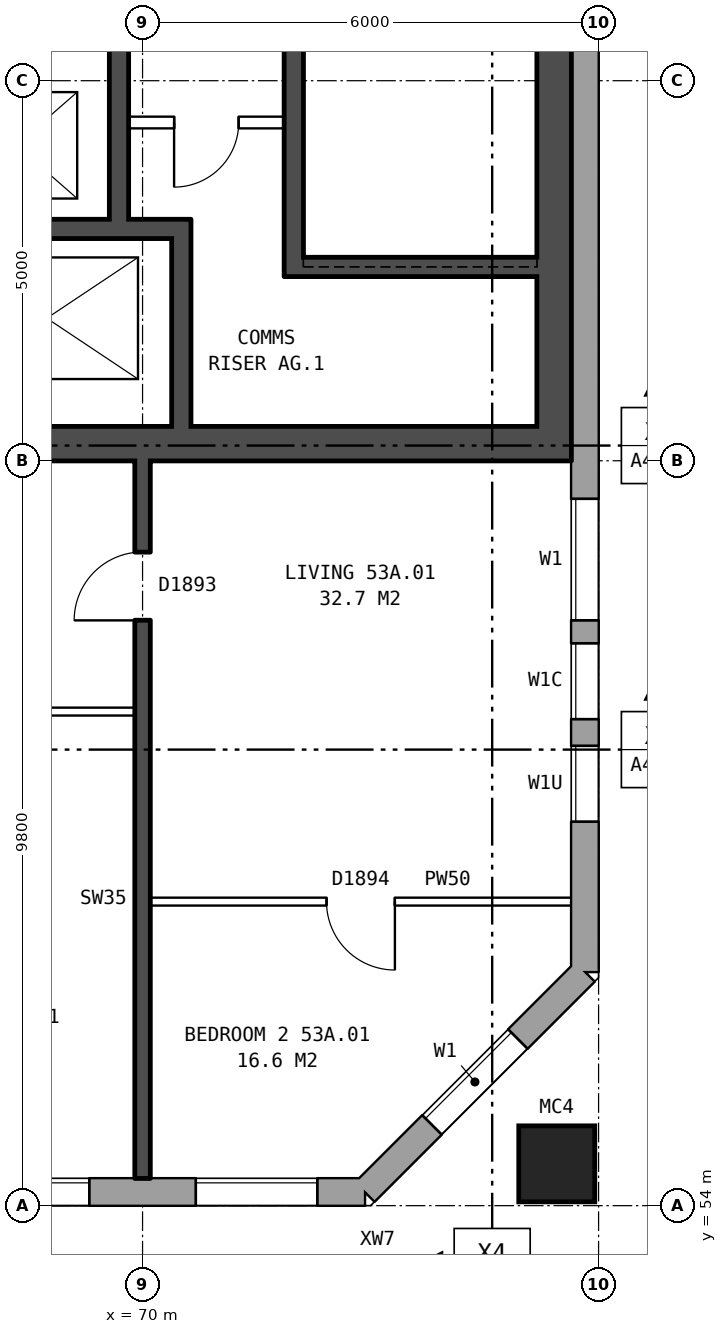
"""IFC4 building model, lengths in metres.
Left out: names, types, materials, properties, quantities, classifications, styles, units other than length and angle.
Written with IfcOpenShell. Run it as: python <this file> out.ifc"""

import sys

from ifc_helpers import new_model, si_unit, direction, frame, frame_2d, origin, origin_2d, place, context, subcontext, project, spatial, rectangle, hollow_rectangle, extrude, element, fill, save


model = new_model("IFC4")
c1 = context("Model", 3, precision=1e-05, world=origin(), true_north=direction((0.0, 1.0)))
c2 = subcontext(c1, "Body", "Model", "MODEL_VIEW")
j1 = project(units=[si_unit("LENGTHUNIT", "METRE"), si_unit("PLANEANGLEUNIT", "RADIAN")], contexts=[c1])
p1 = place(None, origin())
s1 = spatial("IfcSite", under=j1, at=p1, CompositionType="ELEMENT")
p2 = place(p1, origin())
s2 = spatial("IfcBuilding", under=s1, at=p2, CompositionType="ELEMENT")
p3 = place(p2, frame((0.0, 0.0, 188.2)))
s3 = spatial("IfcBuildingStorey", under=s2, at=p3, CompositionType="ELEMENT", Elevation=188.2)
p4 = place(p3, frame((75.45, 54.55, 0.0), z_axis=(0.0, 0.0, 1.0), x_axis=(1.0, 0.0, 0.0)))
e1 = element("IfcColumn", 1, at=p4, inside=s3, PredefinedType="COLUMN", context=c2, shape_type="SweptSolid", body=[
    extrude(hollow_rectangle(XDim=1.0, YDim=1.0, WallThickness=0.055, at=origin_2d()), origin(), (0.0, 0.0, 1.0), 3.1),
])
p5 = place(p3, frame((33.325, 54.18, 0.0), z_axis=(0.0, 0.0, 1.0), x_axis=(1.0, 0.0, 0.0)))
e2 = element("IfcWall", 2, at=p5, inside=s3, PredefinedType="STANDARD", context=c2, shape_type="SweptSolid", body=[
    extrude(rectangle(XDim=39.601, YDim=0.36, at=frame_2d((19.8, 0.0))), origin(), (0.0, 0.0, 1.0), 2.85),
])
p6 = place(p5, frame((1.375, 0.0, 0.8)))
e3 = element("IfcOpeningElement", 3, at=p6, cuts=e2, PredefinedType="OPENING", context=c2, shape_type="SweptSolid", body=[
    extrude(rectangle(XDim=1.6, YDim=1.8, at=frame_2d((0.8, 0.9))), frame((0.0, 0.19, 0.0), z_axis=(0.0, -1.0, 0.0), x_axis=(1.0, 0.0, 0.0)), (0.0, 0.0, 1.0), 0.38),
])
p7 = place(p5, frame((4.375, 0.0, 0.8)))
e4 = element("IfcOpeningElement", 4, at=p7, cuts=e2, PredefinedType="OPENING", context=c2, shape_type="SweptSolid", body=[
    extrude(rectangle(XDim=1.6, YDim=1.8, at=frame_2d((0.8, 0.9))), frame((0.0, 0.19, 0.0), z_axis=(0.0, -1.0, 0.0), x_axis=(1.0, 0.0, 0.0)), (0.0, 0.0, 1.0), 0.38),
])
p8 = place(p5, frame((7.375, 0.0, 0.8)))
e5 = element("IfcOpeningElement", 5, at=p8, cuts=e2, PredefinedType="OPENING", context=c2, shape_type="SweptSolid", body=[
    extrude(rectangle(XDim=1.6, YDim=1.8, at=frame_2d((0.8, 0.9))), frame((0.0, 0.19, 0.0), z_axis=(0.0, -1.0, 0.0), x_axis=(1.0, 0.0, 0.0)), (0.0, 0.0, 1.0), 0.38),
])
p9 = place(p5, frame((10.375, 0.0, 0.8)))
e6 = element("IfcOpeningElement", 6, at=p9, cuts=e2, PredefinedType="OPENING", context=c2, shape_type="SweptSolid", body=[
    extrude(rectangle(XDim=1.6, YDim=1.8, at=frame_2d((0.8, 0.9))), frame((0.0, 0.19, 0.0), z_axis=(0.0, -1.0, 0.0), x_axis=(1.0, 0.0, 0.0)), (0.0, 0.0, 1.0), 0.38),
])
p10 = place(p5, frame((12.875, 0.0, 0.8)))
e7 = element("IfcOpeningElement", 7, at=p10, cuts=e2, PredefinedType="OPENING", context=c2, shape_type="SweptSolid", body=[
    extrude(rectangle(XDim=1.2, YDim=1.8, at=frame_2d((0.6, 0.9))), frame((0.0, 0.19, 0.0), z_axis=(0.0, -1.0, 0.0), x_axis=(1.0, 0.0, 0.0)), (0.0, 0.0, 1.0), 0.38),
])
p11 = place(p5, frame((16.225, 0.0, 0.8)))
e8 = element("IfcOpeningElement", 8, at=p11, cuts=e2, PredefinedType="OPENING", context=c2, shape_type="SweptSolid", body=[
    extrude(rectangle(XDim=0.6, YDim=0.9, at=frame_2d((0.3, 0.45))), frame((0.0, 0.19, 0.0), z_axis=(0.0, -1.0, 0.0), x_axis=(1.0, 0.0, 0.0)), (0.0, 0.0, 1.0), 0.38),
])
p12 = place(p5, frame((19.375, 0.0, 0.8)))
e9 = element("IfcOpeningElement", 9, at=p12, cuts=e2, PredefinedType="OPENING", context=c2, shape_type="SweptSolid", body=[
    extrude(rectangle(XDim=1.6, YDim=1.8, at=frame_2d((0.8, 0.9))), frame((0.0, 0.19, 0.0), z_axis=(0.0, -1.0, 0.0), x_axis=(1.0, 0.0, 0.0)), (0.0, 0.0, 1.0), 0.38),
])
p13 = place(p5, frame((21.875, 0.0, 0.15)))
e10 = element("IfcOpeningElement", 10, at=p13, cuts=e2, PredefinedType="OPENING", context=c2, shape_type="SweptSolid", body=[
    extrude(rectangle(XDim=1.2, YDim=1.8, at=frame_2d((0.6, 0.9))), frame((0.0, 0.19, 0.0), z_axis=(0.0, -1.0, 0.0), x_axis=(1.0, 0.0, 0.0)), (0.0, 0.0, 1.0), 0.38),
])
p14 = place(p5, frame((25.375, 0.0, 0.8)))
e11 = element("IfcOpeningElement", 11, at=p14, cuts=e2, PredefinedType="OPENING", context=c2, shape_type="SweptSolid", body=[
    extrude(rectangle(XDim=1.6, YDim=1.8, at=frame_2d((0.8, 0.9))), frame((0.0, 0.19, 0.0), z_axis=(0.0, -1.0, 0.0), x_axis=(1.0, 0.0, 0.0)), (0.0, 0.0, 1.0), 0.38),
])
p15 = place(p5, frame((28.375, 0.0, 0.8)))
e12 = element("IfcOpeningElement", 12, at=p15, cuts=e2, PredefinedType="OPENING", context=c2, shape_type="SweptSolid", body=[
    extrude(rectangle(XDim=1.6, YDim=1.8, at=frame_2d((0.8, 0.9))), frame((0.0, 0.19, 0.0), z_axis=(0.0, -1.0, 0.0), x_axis=(1.0, 0.0, 0.0)), (0.0, 0.0, 1.0), 0.38),
])
p16 = place(p5, frame((31.375, 0.0, 0.8)))
e13 = element("IfcOpeningElement", 13, at=p16, cuts=e2, PredefinedType="OPENING", context=c2, shape_type="SweptSolid", body=[
    extrude(rectangle(XDim=1.6, YDim=1.8, at=frame_2d((0.8, 0.9))), frame((0.0, 0.19, 0.0), z_axis=(0.0, -1.0, 0.0), x_axis=(1.0, 0.0, 0.0)), (0.0, 0.0, 1.0), 0.38),
])
p17 = place(p5, frame((34.375, 0.0, 0.8)))
e14 = element("IfcOpeningElement", 14, at=p17, cuts=e2, PredefinedType="OPENING", context=c2, shape_type="SweptSolid", body=[
    extrude(rectangle(XDim=1.6, YDim=1.8, at=frame_2d((0.8, 0.9))), frame((0.0, 0.19, 0.0), z_axis=(0.0, -1.0, 0.0), x_axis=(1.0, 0.0, 0.0)), (0.0, 0.0, 1.0), 0.38),
])
p18 = place(p5, frame((37.375, 0.0, 0.8)))
e15 = element("IfcOpeningElement", 15, at=p18, cuts=e2, PredefinedType="OPENING", context=c2, shape_type="SweptSolid", body=[
    extrude(rectangle(XDim=1.6, YDim=1.8, at=frame_2d((0.8, 0.9))), frame((0.0, 0.19, 0.0), z_axis=(0.0, -1.0, 0.0), x_axis=(1.0, 0.0, 0.0)), (0.0, 0.0, 1.0), 0.38),
])
p19 = place(p5, frame((14.375, 0.0, 1.6)))
e16 = element("IfcOpeningElement", 16, at=p19, cuts=e2, PredefinedType="OPENING", context=c2, shape_type="SweptSolid", body=[
    extrude(rectangle(XDim=0.6, YDim=0.9, at=frame_2d((0.3, 0.45))), frame((0.0, 0.19, 0.0), z_axis=(0.0, -1.0, 0.0), x_axis=(1.0, 0.0, 0.0)), (0.0, 0.0, 1.0), 0.38),
])
p20 = place(p5, frame((17.125, 0.0, 0.8)))
e17 = element("IfcOpeningElement", 17, at=p20, cuts=e2, PredefinedType="OPENING", context=c2, shape_type="SweptSolid", body=[
    extrude(rectangle(XDim=1.2, YDim=1.8, at=frame_2d((0.6, 0.9))), frame((0.0, 0.19, 0.0), z_axis=(0.0, -1.0, 0.0), x_axis=(1.0, 0.0, 0.0)), (0.0, 0.0, 1.0), 0.38),
])
p21 = place(p5, frame((23.375, 0.0, 0.15)))
e18 = element("IfcOpeningElement", 18, at=p21, cuts=e2, PredefinedType="OPENING", context=c2, shape_type="SweptSolid", body=[
    extrude(rectangle(XDim=0.6, YDim=0.9, at=frame_2d((0.3, 0.45))), frame((0.0, 0.19, 0.0), z_axis=(0.0, -1.0, 0.0), x_axis=(1.0, 0.0, 0.0)), (0.0, 0.0, 1.0), 0.38),
])
p22 = place(p3, frame((72.925, 54.18, 0.0), z_axis=(0.0, 0.0, 1.0), x_axis=(0.707106781187, 0.707106781187, 0.0)))
e19 = element("IfcWall", 19, at=p22, inside=s3, PredefinedType="STANDARD", context=c2, shape_type="SweptSolid", body=[
    extrude(rectangle(XDim=4.094, YDim=0.36, at=frame_2d((2.047, 0.0))), origin(), (0.0, 0.0, 1.0), 2.85),
])
p23 = place(p22, frame((1.247, 0.0, 0.8)))
e20 = element("IfcOpeningElement", 20, at=p23, cuts=e19, PredefinedType="OPENING", context=c2, shape_type="SweptSolid", body=[
    extrude(rectangle(XDim=1.6, YDim=1.8, at=frame_2d((0.8, 0.9))), frame((0.0, 0.19, 0.0), z_axis=(0.0, -1.0, 0.0), x_axis=(1.0, 0.0, 0.0)), (0.0, 0.0, 1.0), 0.38),
])
p24 = place(p3, frame((75.82, 57.075, 0.0), z_axis=(0.0, 0.0, 1.0), x_axis=(0.0, 1.0, 0.0)))
e21 = element("IfcWall", 21, at=p24, inside=s3, PredefinedType="STANDARD", context=c2, shape_type="SweptSolid", body=[
    extrude(rectangle(XDim=25.851, YDim=0.36, at=frame_2d((12.925, 0.0))), origin(), (0.0, 0.0, 1.0), 2.85),
])
p25 = place(p24, frame((1.975, 0.0, 1.7)))
e22 = element("IfcOpeningElement", 22, at=p25, cuts=e21, PredefinedType="OPENING", context=c2, shape_type="SweptSolid", body=[
    extrude(rectangle(XDim=1.0, YDim=0.9, at=frame_2d((0.5, 0.45))), frame((0.0, 0.19, 0.0), z_axis=(0.0, -1.0, 0.0), x_axis=(1.0, 0.0, 0.0)), (0.0, 0.0, 1.0), 0.38),
])
p26 = place(p24, frame((4.625, 0.0, 0.8)))
e23 = element("IfcOpeningElement", 23, at=p26, cuts=e21, PredefinedType="OPENING", context=c2, shape_type="SweptSolid", body=[
    extrude(rectangle(XDim=1.6, YDim=1.8, at=frame_2d((0.8, 0.9))), frame((0.0, 0.19, 0.0), z_axis=(0.0, -1.0, 0.0), x_axis=(1.0, 0.0, 0.0)), (0.0, 0.0, 1.0), 0.38),
])
p27 = place(p24, frame((19.625, 0.0, 0.8)))
e24 = element("IfcOpeningElement", 24, at=p27, cuts=e21, PredefinedType="OPENING", context=c2, shape_type="SweptSolid", body=[
    extrude(rectangle(XDim=1.6, YDim=1.8, at=frame_2d((0.8, 0.9))), frame((0.0, 0.19, 0.0), z_axis=(0.0, -1.0, 0.0), x_axis=(1.0, 0.0, 0.0)), (0.0, 0.0, 1.0), 0.38),
])
p28 = place(p24, frame((21.55, 0.0, 1.1)))
e25 = element("IfcOpeningElement", 25, at=p28, cuts=e21, PredefinedType="OPENING", context=c2, shape_type="SweptSolid", body=[
    extrude(rectangle(XDim=1.4, YDim=1.5, at=frame_2d((0.7, 0.75))), frame((0.0, 0.19, 0.0), z_axis=(0.0, -1.0, 0.0), x_axis=(1.0, 0.0, 0.0)), (0.0, 0.0, 1.0), 0.38),
])
p29 = place(p24, frame((3.325, 0.0, 0.8)))
e26 = element("IfcOpeningElement", 26, at=p29, cuts=e21, PredefinedType="OPENING", context=c2, shape_type="SweptSolid", body=[
    extrude(rectangle(XDim=1.0, YDim=1.8, at=frame_2d((0.5, 0.9))), frame((0.0, 0.19, 0.0), z_axis=(0.0, -1.0, 0.0), x_axis=(1.0, 0.0, 0.0)), (0.0, 0.0, 1.0), 0.38),
])
p30 = place(p24, frame((23.25, 0.0, 1.7)))
e27 = element("IfcOpeningElement", 27, at=p30, cuts=e21, PredefinedType="OPENING", context=c2, shape_type="SweptSolid", body=[
    extrude(rectangle(XDim=0.6, YDim=0.9, at=frame_2d((0.3, 0.45))), frame((0.0, 0.19, 0.0), z_axis=(0.0, -1.0, 0.0), x_axis=(1.0, 0.0, 0.0)), (0.0, 0.0, 1.0), 0.38),
])
p31 = place(p3, frame((75.415, 63.8, 0.0), z_axis=(0.0, 0.0, 1.0), x_axis=(0.0, 1.0, 0.0)))
e28 = element("IfcWall", 28, at=p31, inside=s3, PredefinedType="SHEAR", context=c2, shape_type="SweptSolid", body=[
    extrude(rectangle(XDim=12.4, YDim=0.45, at=frame_2d((6.2, 0.0))), origin(), (0.0, 0.0, 1.0), 2.85),
])
p32 = place(p3, frame((67.09, 64.025, 0.0), z_axis=(0.0, 0.0, 1.0), x_axis=(1.0, 0.0, 0.0)))
e29 = element("IfcWall", 29, at=p32, inside=s3, PredefinedType="SHEAR", context=c2, shape_type="SweptSolid", body=[
    extrude(rectangle(XDim=8.1, YDim=0.45, at=frame_2d((4.05, 0.0))), origin(), (0.0, 0.0, 1.0), 2.85),
])
p33 = place(p3, frame((72.115, 66.35, 0.0), z_axis=(0.0, 0.0, 1.0), x_axis=(1.0, 0.0, 0.0)))
e30 = element("IfcWall", 30, at=p33, inside=s3, PredefinedType="SHEAR", context=c2, shape_type="SweptSolid", body=[
    extrude(rectangle(XDim=3.075, YDim=0.25, at=frame_2d((1.538, 0.0))), origin(), (0.0, 0.0, 1.0), 2.85),
])
p34 = place(p3, frame((67.09, 66.85, 0.0), z_axis=(0.0, 0.0, 1.0), x_axis=(1.0, 0.0, 0.0)))
e31 = element("IfcWall", 31, at=p34, inside=s3, PredefinedType="SHEAR", context=c2, shape_type="SweptSolid", body=[
    extrude(rectangle(XDim=3.545, YDim=0.25, at=frame_2d((1.772, 0.0))), origin(), (0.0, 0.0, 1.0), 2.85),
])
p35 = place(p3, frame((69.815, 68.25, 0.0), z_axis=(0.0, 0.0, 1.0), x_axis=(1.0, 0.0, 0.0)))
e32 = element("IfcWall", 32, at=p35, inside=s3, PredefinedType="PARTITIONING", context=c2, shape_type="SweptSolid", body=[
    extrude(rectangle(XDim=2.05, YDim=0.15, at=frame_2d((1.025, 0.0))), origin(), (0.0, 0.0, 1.0), 2.85),
])
p36 = place(p35, frame((0.6, 0.0, 0.0)))
e33 = element("IfcOpeningElement", 33, at=p36, cuts=e32, PredefinedType="OPENING", context=c2, shape_type="SweptSolid", body=[
    extrude(rectangle(XDim=0.85, YDim=2.1, at=frame_2d((0.425, 1.05))), frame((0.0, 0.085, 0.0), z_axis=(0.0, -1.0, 0.0), x_axis=(1.0, 0.0, 0.0)), (0.0, 0.0, 1.0), 0.17),
])
p37 = place(p3, frame((69.69, 66.975, 0.0), z_axis=(0.0, 0.0, 1.0), x_axis=(0.0, 1.0, 0.0)))
e34 = element("IfcWall", 34, at=p37, inside=s3, PredefinedType="SHEAR", context=c2, shape_type="SweptSolid", body=[
    extrude(rectangle(XDim=6.6, YDim=0.25, at=frame_2d((3.3, 0.0))), origin(), (0.0, 0.0, 1.0), 2.85),
])
p38 = place(p3, frame((70.51, 64.25, 0.0), z_axis=(0.0, 0.0, 1.0), x_axis=(0.0, 1.0, 0.0)))
e35 = element("IfcWall", 35, at=p38, inside=s3, PredefinedType="SHEAR", context=c2, shape_type="SweptSolid", body=[
    extrude(rectangle(XDim=2.475, YDim=0.25, at=frame_2d((1.238, 0.0))), origin(), (0.0, 0.0, 1.0), 2.85),
])
p39 = place(p3, frame((71.99, 66.225, 0.0), z_axis=(0.0, 0.0, 1.0), x_axis=(0.0, 1.0, 0.0)))
e36 = element("IfcWall", 36, at=p39, inside=s3, PredefinedType="SHEAR", context=c2, shape_type="SweptSolid", body=[
    extrude(rectangle(XDim=7.225, YDim=0.25, at=frame_2d((3.612, 0.0))), origin(), (0.0, 0.0, 1.0), 2.85),
])
p40 = place(p39, frame((5.925, 0.0, 0.0)))
e37 = element("IfcOpeningElement", 37, at=p40, cuts=e36, PredefinedType="OPENING", context=c2, shape_type="SweptSolid", body=[
    extrude(rectangle(XDim=1.1, YDim=2.1, at=frame_2d((0.55, 1.05))), frame((0.0, 0.135, 0.0), z_axis=(0.0, -1.0, 0.0), x_axis=(1.0, 0.0, 0.0)), (0.0, 0.0, 1.0), 0.27),
])
p41 = place(p3, frame((70.1, 58.0, 0.0), z_axis=(0.0, 0.0, 1.0), x_axis=(1.0, 0.0, 0.0)))
e38 = element("IfcWall", 38, at=p41, inside=s3, PredefinedType="PARTITIONING", context=c2, shape_type="SweptSolid", body=[
    extrude(rectangle(XDim=5.54, YDim=0.1, at=frame_2d((2.77, 0.0))), origin(), (0.0, 0.0, 1.0), 2.85),
])
p42 = place(p41, frame((2.32, 0.0, 0.0)))
e39 = element("IfcOpeningElement", 39, at=p42, cuts=e38, PredefinedType="OPENING", context=c2, shape_type="SweptSolid", body=[
    extrude(rectangle(XDim=0.9, YDim=2.1, at=frame_2d((0.45, 1.05))), frame((0.0, 0.06, 0.0), z_axis=(0.0, -1.0, 0.0), x_axis=(1.0, 0.0, 0.0)), (0.0, 0.0, 1.0), 0.12),
])
p43 = place(p3, frame((64.1, 60.5, 0.0), z_axis=(0.0, 0.0, 1.0), x_axis=(1.0, 0.0, 0.0)))
e40 = element("IfcWall", 40, at=p43, inside=s3, PredefinedType="PARTITIONING", context=c2, shape_type="SweptSolid", body=[
    extrude(rectangle(XDim=5.8, YDim=0.1, at=frame_2d((2.9, 0.0))), origin(), (0.0, 0.0, 1.0), 2.85),
])
p44 = place(p43, frame((3.6, 0.0, 0.0)))
e41 = element("IfcOpeningElement", 41, at=p44, cuts=e40, PredefinedType="OPENING", context=c2, shape_type="SweptSolid", body=[
    extrude(rectangle(XDim=0.9, YDim=2.1, at=frame_2d((0.45, 1.05))), frame((0.0, 0.06, 0.0), z_axis=(0.0, -1.0, 0.0), x_axis=(1.0, 0.0, 0.0)), (0.0, 0.0, 1.0), 0.12),
])
p45 = place(p43, frame((0.7, 0.0, 0.0)))
e42 = element("IfcOpeningElement", 42, at=p45, cuts=e40, PredefinedType="OPENING", context=c2, shape_type="SweptSolid", body=[
    extrude(rectangle(XDim=0.9, YDim=2.1, at=frame_2d((0.45, 1.05))), frame((0.0, 0.06, 0.0), z_axis=(0.0, -1.0, 0.0), x_axis=(1.0, 0.0, 0.0)), (0.0, 0.0, 1.0), 0.12),
])
p46 = place(p3, frame((70.0, 54.36, 0.0), z_axis=(0.0, 0.0, 1.0), x_axis=(0.0, 1.0, 0.0)))
e43 = element("IfcWall", 43, at=p46, inside=s3, PredefinedType="SOLIDWALL", context=c2, shape_type="SweptSolid", body=[
    extrude(rectangle(XDim=9.44, YDim=0.2, at=frame_2d((4.72, 0.0))), origin(), (0.0, 0.0, 1.0), 2.85),
])
p47 = place(p46, frame((7.34, 0.0, 0.0)))
e44 = element("IfcOpeningElement", 44, at=p47, cuts=e43, PredefinedType="OPENING", context=c2, shape_type="SweptSolid", body=[
    extrude(rectangle(XDim=0.9, YDim=2.1, at=frame_2d((0.45, 1.05))), frame((0.0, 0.11, 0.0), z_axis=(0.0, -1.0, 0.0), x_axis=(1.0, 0.0, 0.0)), (0.0, 0.0, 1.0), 0.22),
])
p48 = place(p17, origin())
e45 = element("IfcWindow", 45, at=p48, inside=s3, PartitioningType="SINGLE_PANEL", PredefinedType="WINDOW", context=c2, shape_type="SweptSolid", body=[
    extrude(rectangle(XDim=1.6, YDim=1.8, at=frame_2d((0.8, 0.9))), frame((0.0, 0.15, 0.0), z_axis=(0.0, -1.0, 0.0), x_axis=(1.0, 0.0, 0.0)), (0.0, 0.0, 1.0), 0.06),
])
fill(e14, e45)
p49 = place(p18, origin())
e46 = element("IfcWindow", 46, at=p49, inside=s3, PartitioningType="SINGLE_PANEL", PredefinedType="WINDOW", context=c2, shape_type="SweptSolid", body=[
    extrude(rectangle(XDim=1.6, YDim=1.8, at=frame_2d((0.8, 0.9))), frame((0.0, 0.15, 0.0), z_axis=(0.0, -1.0, 0.0), x_axis=(1.0, 0.0, 0.0)), (0.0, 0.0, 1.0), 0.06),
])
fill(e15, e46)
p50 = place(p23, origin())
e47 = element("IfcWindow", 47, at=p50, inside=s3, PartitioningType="SINGLE_PANEL", PredefinedType="WINDOW", context=c2, shape_type="SweptSolid", body=[
    extrude(rectangle(XDim=1.6, YDim=1.8, at=frame_2d((0.8, 0.9))), frame((0.0, 0.15, 0.0), z_axis=(0.0, -1.0, 0.0), x_axis=(1.0, 0.0, 0.0)), (0.0, 0.0, 1.0), 0.06),
])
fill(e20, e47)
p51 = place(p25, origin())
e48 = element("IfcWindow", 48, at=p51, inside=s3, PartitioningType="SINGLE_PANEL", PredefinedType="WINDOW", context=c2, shape_type="SweptSolid", body=[
    extrude(rectangle(XDim=1.0, YDim=0.9, at=frame_2d((0.5, 0.45))), frame((0.0, 0.15, 0.0), z_axis=(0.0, -1.0, 0.0), x_axis=(1.0, 0.0, 0.0)), (0.0, 0.0, 1.0), 0.06),
])
fill(e22, e48)
p52 = place(p26, origin())
e49 = element("IfcWindow", 49, at=p52, inside=s3, PartitioningType="SINGLE_PANEL", PredefinedType="WINDOW", context=c2, shape_type="SweptSolid", body=[
    extrude(rectangle(XDim=1.6, YDim=1.8, at=frame_2d((0.8, 0.9))), frame((0.0, 0.15, 0.0), z_axis=(0.0, -1.0, 0.0), x_axis=(1.0, 0.0, 0.0)), (0.0, 0.0, 1.0), 0.06),
])
fill(e23, e49)
p53 = place(p36, frame((0.85, 0.0, 0.0), z_axis=(0.0, 0.0, 1.0), x_axis=(-1.0, 0.0, 0.0)))
e50 = element("IfcDoor", 50, at=p53, inside=s3, OperationType="SINGLE_SWING_RIGHT", PredefinedType="DOOR", context=c2, shape_type="SweptSolid", body=[
    extrude(rectangle(XDim=0.85, YDim=2.1, at=frame_2d((0.425, 1.05))), frame((0.0, 0.025, 0.0), z_axis=(0.0, -1.0, 0.0), x_axis=(1.0, 0.0, 0.0)), (0.0, 0.0, 1.0), 0.05),
])
fill(e33, e50)
p54 = place(p42, frame((0.9, 0.0, 0.0), z_axis=(0.0, 0.0, 1.0), x_axis=(-1.0, 0.0, 0.0)))
e51 = element("IfcDoor", 51, at=p54, inside=s3, OperationType="SINGLE_SWING_LEFT", PredefinedType="DOOR", context=c2, shape_type="SweptSolid", body=[
    extrude(rectangle(XDim=0.9, YDim=2.1, at=frame_2d((0.45, 1.05))), frame((0.0, 0.025, 0.0), z_axis=(0.0, -1.0, 0.0), x_axis=(1.0, 0.0, 0.0)), (0.0, 0.0, 1.0), 0.05),
])
fill(e39, e51)
p55 = place(p47, origin())
e52 = element("IfcDoor", 52, at=p55, inside=s3, OperationType="SINGLE_SWING_LEFT", PredefinedType="DOOR", context=c2, shape_type="SweptSolid", body=[
    extrude(rectangle(XDim=0.9, YDim=2.1, at=frame_2d((0.45, 1.05))), frame((0.0, 0.025, 0.0), z_axis=(0.0, -1.0, 0.0), x_axis=(1.0, 0.0, 0.0)), (0.0, 0.0, 1.0), 0.05),
])
fill(e44, e52)
p56 = place(p29, origin())
e53 = element("IfcWindow", 53, at=p56, inside=s3, PartitioningType="SINGLE_PANEL", PredefinedType="WINDOW", context=c2, shape_type="SweptSolid", body=[
    extrude(rectangle(XDim=1.0, YDim=1.8, at=frame_2d((0.5, 0.9))), frame((0.0, 0.15, 0.0), z_axis=(0.0, -1.0, 0.0), x_axis=(1.0, 0.0, 0.0)), (0.0, 0.0, 1.0), 0.06),
])
fill(e26, e53)
save(model, sys.argv[1])
